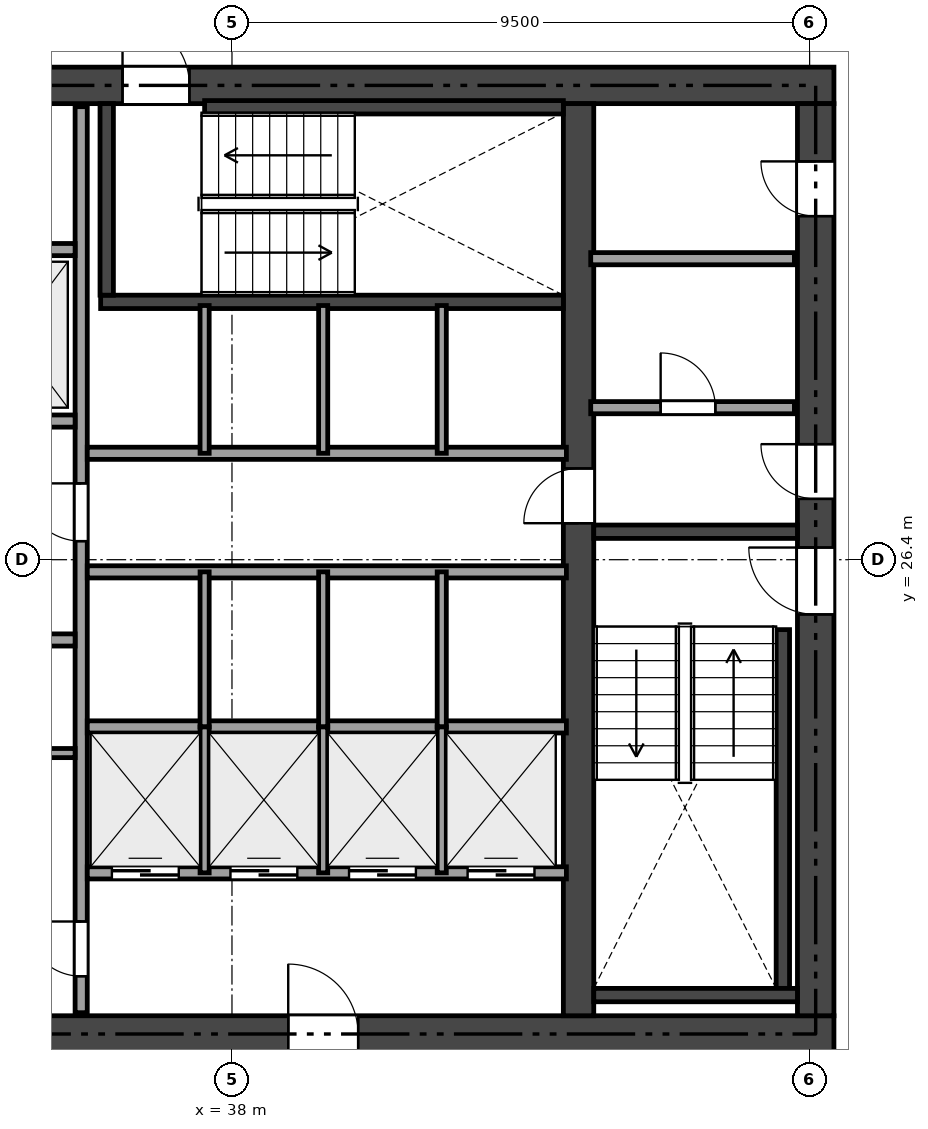
"""IFC4 building model, lengths in metres.
Left out: names, types, materials, properties, quantities, classifications, styles, units other than length and angle.
Written with IfcOpenShell. Run it as: python <this file> out.ifc"""

import sys

from ifc_helpers import new_model, si_unit, direction, frame, frame_2d, origin, place, context, subcontext, project, spatial, rectangle, extrude, element, fill, save


model = new_model("IFC4")
c1 = context("Model", 3, precision=1e-05, world=origin(), true_north=direction((0.0, 1.0)))
c2 = subcontext(c1, "Body", "Model", "MODEL_VIEW")
j1 = project(units=[si_unit("LENGTHUNIT", "METRE"), si_unit("PLANEANGLEUNIT", "RADIAN")], contexts=[c1])
p1 = place(None, origin())
s1 = spatial("IfcSite", under=j1, at=p1, CompositionType="ELEMENT")
p2 = place(p1, origin())
s2 = spatial("IfcBuilding", under=s1, at=p2, CompositionType="ELEMENT")
p3 = place(p2, frame((0.0, 0.0, 76.35)))
s3 = spatial("IfcBuildingStorey", under=s2, at=p3, CompositionType="ELEMENT", Elevation=76.35)
p4 = place(p3, frame((26.5, 18.6, 0.0), z_axis=(0.0, 0.0, 1.0), x_axis=(1.0, 0.0, 0.0)))
e1 = element("IfcWall", 1, at=p4, inside=s3, PredefinedType="SHEAR", context=c2, shape_type="SweptSolid", body=[
    extrude(rectangle(XDim=21.4, YDim=0.6, at=frame_2d((10.7, 0.0))), origin(), (0.0, 0.0, 1.0), 3.17),
])
p5 = place(p4, frame((12.425, 0.0, 0.0)))
e2 = element("IfcOpeningElement", 2, at=p5, cuts=e1, PredefinedType="OPENING", context=c2, shape_type="SweptSolid", body=[
    extrude(rectangle(XDim=1.15, YDim=2.15, at=frame_2d((0.575, 1.075))), frame((0.0, 0.31, 0.0), z_axis=(0.0, -1.0, 0.0), x_axis=(1.0, 0.0, 0.0)), (0.0, 0.0, 1.0), 0.62),
])
p6 = place(p4, frame((5.25, 0.0, 0.0)))
e3 = element("IfcOpeningElement", 3, at=p6, cuts=e1, PredefinedType="OPENING", context=c2, shape_type="SweptSolid", body=[
    extrude(rectangle(XDim=0.9, YDim=2.1, at=frame_2d((0.45, 1.05))), frame((0.0, 0.31, 0.0), z_axis=(0.0, -1.0, 0.0), x_axis=(1.0, 0.0, 0.0)), (0.0, 0.0, 1.0), 0.62),
])
p7 = place(p3, frame((26.5, 34.2, 0.0), z_axis=(0.0, 0.0, 1.0), x_axis=(1.0, 0.0, 0.0)))
e4 = element("IfcWall", 4, at=p7, inside=s3, PredefinedType="SHEAR", context=c2, shape_type="SweptSolid", body=[
    extrude(rectangle(XDim=21.4, YDim=0.6, at=frame_2d((10.7, 0.0))), origin(), (0.0, 0.0, 1.0), 3.17),
])
p8 = place(p7, frame((9.7, 0.0, 0.0)))
e5 = element("IfcOpeningElement", 5, at=p8, cuts=e4, PredefinedType="OPENING", context=c2, shape_type="SweptSolid", body=[
    extrude(rectangle(XDim=1.1, YDim=2.15, at=frame_2d((0.55, 1.075))), frame((0.0, 0.31, 0.0), z_axis=(0.0, -1.0, 0.0), x_axis=(1.0, 0.0, 0.0)), (0.0, 0.0, 1.0), 0.62),
])
p9 = place(p7, frame((1.95, 0.0, 0.0)))
e6 = element("IfcOpeningElement", 6, at=p9, cuts=e4, PredefinedType="OPENING", context=c2, shape_type="SweptSolid", body=[
    extrude(rectangle(XDim=0.9, YDim=2.1, at=frame_2d((0.45, 1.05))), frame((0.0, 0.31, 0.0), z_axis=(0.0, -1.0, 0.0), x_axis=(1.0, 0.0, 0.0)), (0.0, 0.0, 1.0), 0.62),
])
p10 = place(p7, frame((6.25, 0.0, 0.0)))
e7 = element("IfcOpeningElement", 7, at=p10, cuts=e4, PredefinedType="OPENING", context=c2, shape_type="SweptSolid", body=[
    extrude(rectangle(XDim=0.9, YDim=2.1, at=frame_2d((0.45, 1.05))), frame((0.0, 0.31, 0.0), z_axis=(0.0, -1.0, 0.0), x_axis=(1.0, 0.0, 0.0)), (0.0, 0.0, 1.0), 0.62),
])
p11 = place(p3, frame((47.6, 18.9, 0.0), z_axis=(0.0, 0.0, 1.0), x_axis=(0.0, 1.0, 0.0)))
e8 = element("IfcWall", 8, at=p11, inside=s3, PredefinedType="SHEAR", context=c2, shape_type="SweptSolid", body=[
    extrude(rectangle(XDim=15.0, YDim=0.6, at=frame_2d((7.5, 0.0))), origin(), (0.0, 0.0, 1.0), 3.17),
])
p12 = place(p11, frame((6.6, 0.0, 0.0)))
e9 = element("IfcOpeningElement", 9, at=p12, cuts=e8, PredefinedType="OPENING", context=c2, shape_type="SweptSolid", body=[
    extrude(rectangle(XDim=1.1, YDim=2.15, at=frame_2d((0.55, 1.075))), frame((0.0, 0.31, 0.0), z_axis=(0.0, -1.0, 0.0), x_axis=(1.0, 0.0, 0.0)), (0.0, 0.0, 1.0), 0.62),
])
p13 = place(p11, frame((8.5, 0.0, 0.0)))
e10 = element("IfcOpeningElement", 10, at=p13, cuts=e8, PredefinedType="OPENING", context=c2, shape_type="SweptSolid", body=[
    extrude(rectangle(XDim=0.9, YDim=2.1, at=frame_2d((0.45, 1.05))), frame((0.0, 0.31, 0.0), z_axis=(0.0, -1.0, 0.0), x_axis=(1.0, 0.0, 0.0)), (0.0, 0.0, 1.0), 0.62),
])
p14 = place(p11, frame((13.15, 0.0, 0.0)))
e11 = element("IfcOpeningElement", 11, at=p14, cuts=e8, PredefinedType="OPENING", context=c2, shape_type="SweptSolid", body=[
    extrude(rectangle(XDim=0.9, YDim=2.1, at=frame_2d((0.45, 1.05))), frame((0.0, 0.31, 0.0), z_axis=(0.0, -1.0, 0.0), x_axis=(1.0, 0.0, 0.0)), (0.0, 0.0, 1.0), 0.62),
])
p15 = place(p3, frame((43.7, 18.9, 0.0), z_axis=(0.0, 0.0, 1.0), x_axis=(0.0, 1.0, 0.0)))
e12 = element("IfcWall", 12, at=p15, inside=s3, PredefinedType="SHEAR", context=c2, shape_type="SweptSolid", body=[
    extrude(rectangle(XDim=15.0, YDim=0.5, at=frame_2d((7.5, 0.0))), origin(), (0.0, 0.0, 1.0), 3.17),
])
p16 = place(p15, frame((8.1, 0.0, 0.0)))
e13 = element("IfcOpeningElement", 13, at=p16, cuts=e12, PredefinedType="OPENING", context=c2, shape_type="SweptSolid", body=[
    extrude(rectangle(XDim=0.9, YDim=2.1, at=frame_2d((0.45, 1.05))), frame((0.0, 0.26, 0.0), z_axis=(0.0, -1.0, 0.0), x_axis=(1.0, 0.0, 0.0)), (0.0, 0.0, 1.0), 0.52),
])
p17 = place(p3, frame((43.95, 26.86, 0.0), z_axis=(0.0, 0.0, 1.0), x_axis=(1.0, 0.0, 0.0)))
e14 = element("IfcWall", 14, at=p17, inside=s3, PredefinedType="SHEAR", context=c2, shape_type="SweptSolid", body=[
    extrude(rectangle(XDim=3.35, YDim=0.22, at=frame_2d((1.675, 0.0))), origin(), (0.0, 0.0, 1.0), 3.17),
])
p18 = place(p3, frame((47.06, 19.35, 0.0), z_axis=(0.0, 0.0, 1.0), x_axis=(0.0, 1.0, 0.0)))
e15 = element("IfcWall", 15, at=p18, inside=s3, PredefinedType="SHEAR", context=c2, shape_type="SweptSolid", body=[
    extrude(rectangle(XDim=5.9, YDim=0.22, at=frame_2d((2.95, 0.0))), origin(), (0.0, 0.0, 1.0), 3.17),
])
p19 = place(p3, frame((43.95, 19.24, 0.0), z_axis=(0.0, 0.0, 1.0), x_axis=(1.0, 0.0, 0.0)))
e16 = element("IfcWall", 16, at=p19, inside=s3, PredefinedType="SHEAR", context=c2, shape_type="SweptSolid", body=[
    extrude(rectangle(XDim=3.35, YDim=0.22, at=frame_2d((1.675, 0.0))), origin(), (0.0, 0.0, 1.0), 3.17),
])
p20 = place(p3, frame((35.84, 30.64, 0.0), z_axis=(0.0, 0.0, 1.0), x_axis=(1.0, 0.0, 0.0)))
e17 = element("IfcWall", 17, at=p20, inside=s3, PredefinedType="SHEAR", context=c2, shape_type="SweptSolid", body=[
    extrude(rectangle(XDim=7.61, YDim=0.22, at=frame_2d((3.805, 0.0))), origin(), (0.0, 0.0, 1.0), 3.17),
])
p21 = place(p3, frame((35.94, 30.75, 0.0), z_axis=(0.0, 0.0, 1.0), x_axis=(0.0, 1.0, 0.0)))
e18 = element("IfcWall", 18, at=p21, inside=s3, PredefinedType="SHEAR", context=c2, shape_type="SweptSolid", body=[
    extrude(rectangle(XDim=3.15, YDim=0.22, at=frame_2d((1.575, 0.0))), origin(), (0.0, 0.0, 1.0), 3.17),
])
p22 = place(p3, frame((37.55, 33.84, 0.0), z_axis=(0.0, 0.0, 1.0), x_axis=(1.0, 0.0, 0.0)))
e19 = element("IfcWall", 19, at=p22, inside=s3, PredefinedType="SHEAR", context=c2, shape_type="SweptSolid", body=[
    extrude(rectangle(XDim=5.9, YDim=0.22, at=frame_2d((2.95, 0.0))), origin(), (0.0, 0.0, 1.0), 3.17),
])
p23 = place(p3, frame((43.9, 28.9, 0.0), z_axis=(0.0, 0.0, 1.0), x_axis=(1.0, 0.0, 0.0)))
e20 = element("IfcWall", 20, at=p23, inside=s3, PredefinedType="SOLIDWALL", context=c2, shape_type="SweptSolid", body=[
    extrude(rectangle(XDim=3.35, YDim=0.2, at=frame_2d((1.675, 0.0))), origin(), (0.0, 0.0, 1.0), 3.17),
])
p24 = place(p23, frame((1.15, 0.0, 0.0)))
e21 = element("IfcOpeningElement", 21, at=p24, cuts=e20, PredefinedType="OPENING", context=c2, shape_type="SweptSolid", body=[
    extrude(rectangle(XDim=0.9, YDim=2.1, at=frame_2d((0.45, 1.05))), frame((0.0, 0.11, 0.0), z_axis=(0.0, -1.0, 0.0), x_axis=(1.0, 0.0, 0.0)), (0.0, 0.0, 1.0), 0.22),
])
p25 = place(p3, frame((43.9, 31.35, 0.0), z_axis=(0.0, 0.0, 1.0), x_axis=(1.0, 0.0, 0.0)))
e22 = element("IfcWall", 22, at=p25, inside=s3, PredefinedType="SOLIDWALL", context=c2, shape_type="SweptSolid", body=[
    extrude(rectangle(XDim=3.35, YDim=0.2, at=frame_2d((1.675, 0.0))), origin(), (0.0, 0.0, 1.0), 3.17),
])
p26 = place(p3, frame((35.52, 18.95, 0.0), z_axis=(0.0, 0.0, 1.0), x_axis=(0.0, 1.0, 0.0)))
e23 = element("IfcWall", 23, at=p26, inside=s3, PredefinedType="SOLIDWALL", context=c2, shape_type="SweptSolid", body=[
    extrude(rectangle(XDim=14.9, YDim=0.2, at=frame_2d((7.45, 0.0))), origin(), (0.0, 0.0, 1.0), 2.691),
])
p27 = place(p26, frame((7.755, 0.0, 0.0)))
e24 = element("IfcOpeningElement", 24, at=p27, cuts=e23, PredefinedType="OPENING", context=c2, shape_type="SweptSolid", body=[
    extrude(rectangle(XDim=0.95, YDim=2.15, at=frame_2d((0.475, 1.075))), frame((0.0, 0.11, 0.0), z_axis=(0.0, -1.0, 0.0), x_axis=(1.0, 0.0, 0.0)), (0.0, 0.0, 1.0), 0.22),
])
p28 = place(p26, frame((0.6, 0.0, 0.0)))
e25 = element("IfcOpeningElement", 25, at=p28, cuts=e23, PredefinedType="OPENING", context=c2, shape_type="SweptSolid", body=[
    extrude(rectangle(XDim=0.9, YDim=2.1, at=frame_2d((0.45, 1.05))), frame((0.0, 0.11, 0.0), z_axis=(0.0, -1.0, 0.0), x_axis=(1.0, 0.0, 0.0)), (0.0, 0.0, 1.0), 0.22),
])
p29 = place(p3, frame((31.0, 28.68, 0.0), z_axis=(0.0, 0.0, 1.0), x_axis=(1.0, 0.0, 0.0)))
e26 = element("IfcWall", 26, at=p29, inside=s3, PredefinedType="SOLIDWALL", context=c2, shape_type="SweptSolid", body=[
    extrude(rectangle(XDim=4.42, YDim=0.2, at=frame_2d((2.21, 0.0))), origin(), (0.0, 0.0, 1.0), 3.17),
])
p30 = place(p29, frame((0.6, 0.0, 0.0)))
e27 = element("IfcOpeningElement", 27, at=p30, cuts=e26, PredefinedType="OPENING", context=c2, shape_type="SweptSolid", body=[
    extrude(rectangle(XDim=1.1, YDim=2.15, at=frame_2d((0.55, 1.075))), frame((0.0, 0.11, 0.0), z_axis=(0.0, -1.0, 0.0), x_axis=(1.0, 0.0, 0.0)), (0.0, 0.0, 1.0), 0.22),
])
p31 = place(p29, frame((2.85, 0.0, 0.0)))
e28 = element("IfcOpeningElement", 28, at=p31, cuts=e26, PredefinedType="OPENING", context=c2, shape_type="SweptSolid", body=[
    extrude(rectangle(XDim=1.1, YDim=2.15, at=frame_2d((0.55, 1.075))), frame((0.0, 0.11, 0.0), z_axis=(0.0, -1.0, 0.0), x_axis=(1.0, 0.0, 0.0)), (0.0, 0.0, 1.0), 0.22),
])
p32 = place(p3, frame((31.0, 31.5, 0.0), z_axis=(0.0, 0.0, 1.0), x_axis=(1.0, 0.0, 0.0)))
e29 = element("IfcWall", 29, at=p32, inside=s3, PredefinedType="SOLIDWALL", context=c2, shape_type="SweptSolid", body=[
    extrude(rectangle(XDim=4.42, YDim=0.2, at=frame_2d((2.21, 0.0))), origin(), (0.0, 0.0, 1.0), 3.17),
])
p33 = place(p3, frame((31.0, 25.08, 0.0), z_axis=(0.0, 0.0, 1.0), x_axis=(1.0, 0.0, 0.0)))
e30 = element("IfcWall", 30, at=p33, inside=s3, PredefinedType="SOLIDWALL", context=c2, shape_type="SweptSolid", body=[
    extrude(rectangle(XDim=4.42, YDim=0.2, at=frame_2d((2.21, 0.0))), origin(), (0.0, 0.0, 1.0), 3.17),
])
p34 = place(p33, frame((3.0, 0.0, 0.0)))
e31 = element("IfcOpeningElement", 31, at=p34, cuts=e30, PredefinedType="OPENING", context=c2, shape_type="SweptSolid", body=[
    extrude(rectangle(XDim=0.9, YDim=2.1, at=frame_2d((0.45, 1.05))), frame((0.0, 0.11, 0.0), z_axis=(0.0, -1.0, 0.0), x_axis=(1.0, 0.0, 0.0)), (0.0, 0.0, 1.0), 0.22),
])
p35 = place(p33, frame((0.62, 0.0, 0.0)))
e32 = element("IfcOpeningElement", 32, at=p35, cuts=e30, PredefinedType="OPENING", context=c2, shape_type="SweptSolid", body=[
    extrude(rectangle(XDim=1.2, YDim=2.15, at=frame_2d((0.6, 1.075))), frame((0.0, 0.11, 0.0), z_axis=(0.0, -1.0, 0.0), x_axis=(1.0, 0.0, 0.0)), (0.0, 0.0, 1.0), 0.22),
])
p36 = place(p3, frame((33.42, 23.22, 0.0), z_axis=(0.0, 0.0, 1.0), x_axis=(1.0, 0.0, 0.0)))
e33 = element("IfcWall", 33, at=p36, inside=s3, PredefinedType="PARTITIONING", context=c2, shape_type="SweptSolid", body=[
    extrude(rectangle(XDim=2.0, YDim=0.15, at=frame_2d((1.0, 0.0))), origin(), (0.0, 0.0, 1.0), 3.17),
])
for number, where, z_axis, x_axis in (
    (34, (35.62, 28.15, 0.0), (0.0, 0.0, 1.0), (1.0, 0.0, 0.0)),
    (35, (35.62, 26.2, 0.0), (0.0, 0.0, 1.0), (1.0, 0.0, 0.0)),
):
    element("IfcWall", number, at=place(p3, frame(where, z_axis=z_axis, x_axis=x_axis)), inside=s3, PredefinedType="SOLIDWALL", context=c2, shape_type="SweptSolid", body=[
        extrude(rectangle(XDim=7.88, YDim=0.2, at=frame_2d((3.94, 0.0))), origin(), (0.0, 0.0, 1.0), 3.17),
    ])
p37 = place(p3, frame((35.62, 23.65, 0.0), z_axis=(0.0, 0.0, 1.0), x_axis=(1.0, 0.0, 0.0)))
e36 = element("IfcWall", 36, at=p37, inside=s3, PredefinedType="SOLIDWALL", context=c2, shape_type="SweptSolid", body=[
    extrude(rectangle(XDim=7.88, YDim=0.2, at=frame_2d((3.94, 0.0))), origin(), (0.0, 0.0, 1.0), 2.691),
])
p38 = place(p3, frame((35.62, 21.25, 0.0), z_axis=(0.0, 0.0, 1.0), x_axis=(1.0, 0.0, 0.0)))
e37 = element("IfcWall", 37, at=p38, inside=s3, PredefinedType="SOLIDWALL", context=c2, shape_type="SweptSolid", body=[
    extrude(rectangle(XDim=7.88, YDim=0.2, at=frame_2d((3.94, 0.0))), origin(), (0.0, 0.0, 1.0), 3.17),
])
p39 = place(p38, frame((0.405, 0.0, 0.0)))
e38 = element("IfcOpeningElement", 38, at=p39, cuts=e37, PredefinedType="OPENING", context=c2, shape_type="SweptSolid", body=[
    extrude(rectangle(XDim=1.1, YDim=2.15, at=frame_2d((0.55, 1.075))), frame((0.0, 0.11, 0.0), z_axis=(0.0, -1.0, 0.0), x_axis=(1.0, 0.0, 0.0)), (0.0, 0.0, 1.0), 0.22),
])
p40 = place(p38, frame((2.355, 0.0, 0.0)))
e39 = element("IfcOpeningElement", 39, at=p40, cuts=e37, PredefinedType="OPENING", context=c2, shape_type="SweptSolid", body=[
    extrude(rectangle(XDim=1.1, YDim=2.15, at=frame_2d((0.55, 1.075))), frame((0.0, 0.11, 0.0), z_axis=(0.0, -1.0, 0.0), x_axis=(1.0, 0.0, 0.0)), (0.0, 0.0, 1.0), 0.22),
])
p41 = place(p38, frame((4.305, 0.0, 0.0)))
e40 = element("IfcOpeningElement", 40, at=p41, cuts=e37, PredefinedType="OPENING", context=c2, shape_type="SweptSolid", body=[
    extrude(rectangle(XDim=1.1, YDim=2.15, at=frame_2d((0.55, 1.075))), frame((0.0, 0.11, 0.0), z_axis=(0.0, -1.0, 0.0), x_axis=(1.0, 0.0, 0.0)), (0.0, 0.0, 1.0), 0.22),
])
p42 = place(p38, frame((6.255, 0.0, 0.0)))
e41 = element("IfcOpeningElement", 41, at=p42, cuts=e37, PredefinedType="OPENING", context=c2, shape_type="SweptSolid", body=[
    extrude(rectangle(XDim=1.1, YDim=2.15, at=frame_2d((0.55, 1.075))), frame((0.0, 0.11, 0.0), z_axis=(0.0, -1.0, 0.0), x_axis=(1.0, 0.0, 0.0)), (0.0, 0.0, 1.0), 0.22),
])
for number, where, z_axis, x_axis in (
    (42, (37.55, 28.15, 0.0), (0.0, 0.0, 1.0), (0.0, 1.0, 0.0)),
    (43, (39.5, 28.15, 0.0), (0.0, 0.0, 1.0), (0.0, 1.0, 0.0)),
    (44, (41.45, 28.15, 0.0), (0.0, 0.0, 1.0), (0.0, 1.0, 0.0)),
):
    element("IfcWall", number, at=place(p3, frame(where, z_axis=z_axis, x_axis=x_axis)), inside=s3, PredefinedType="PARTITIONING", context=c2, shape_type="SweptSolid", body=[
        extrude(rectangle(XDim=2.43, YDim=0.15, at=frame_2d((1.215, 0.0))), origin(), (0.0, 0.0, 1.0), 3.17),
    ])
for number, where, z_axis, x_axis in (
    (45, (37.55, 23.65, 0.0), (0.0, 0.0, 1.0), (0.0, 1.0, 0.0)),
    (46, (39.5, 23.65, 0.0), (0.0, 0.0, 1.0), (0.0, 1.0, 0.0)),
    (47, (41.45, 23.65, 0.0), (0.0, 0.0, 1.0), (0.0, 1.0, 0.0)),
):
    element("IfcWall", number, at=place(p3, frame(where, z_axis=z_axis, x_axis=x_axis)), inside=s3, PredefinedType="PARTITIONING", context=c2, shape_type="SweptSolid", body=[
        extrude(rectangle(XDim=2.55, YDim=0.15, at=frame_2d((1.275, 0.0))), origin(), (0.0, 0.0, 1.0), 2.691),
    ])
for number, where, z_axis, x_axis in (
    (48, (37.55, 21.25, 0.0), (0.0, 0.0, 1.0), (0.0, 1.0, 0.0)),
    (49, (39.5, 21.25, 0.0), (0.0, 0.0, 1.0), (0.0, 1.0, 0.0)),
    (50, (41.45, 21.25, 0.0), (0.0, 0.0, 1.0), (0.0, 1.0, 0.0)),
):
    element("IfcWall", number, at=place(p3, frame(where, z_axis=z_axis, x_axis=x_axis)), inside=s3, PredefinedType="PARTITIONING", context=c2, shape_type="SweptSolid", body=[
        extrude(rectangle(XDim=2.4, YDim=0.15, at=frame_2d((1.2, 0.0))), origin(), (0.0, 0.0, 1.0), 2.691),
    ])
p43 = place(p12, origin())
e51 = element("IfcDoor", 51, at=p43, inside=s3, OperationType="SINGLE_SWING_RIGHT", PredefinedType="DOOR", context=c2, shape_type="SweptSolid", body=[
    extrude(rectangle(XDim=1.1, YDim=2.15, at=frame_2d((0.55, 1.075))), frame((0.0, 0.025, 0.0), z_axis=(0.0, -1.0, 0.0), x_axis=(1.0, 0.0, 0.0)), (0.0, 0.0, 1.0), 0.05),
])
fill(e9, e51)
p44 = place(p8, origin())
e52 = element("IfcDoor", 52, at=p44, inside=s3, OperationType="SINGLE_SWING_LEFT", PredefinedType="DOOR", context=c2, shape_type="SweptSolid", body=[
    extrude(rectangle(XDim=1.1, YDim=2.15, at=frame_2d((0.55, 1.075))), frame((0.0, 0.025, 0.0), z_axis=(0.0, -1.0, 0.0), x_axis=(1.0, 0.0, 0.0)), (0.0, 0.0, 1.0), 0.05),
])
fill(e5, e52)
p45 = place(p27, origin())
e53 = element("IfcDoor", 53, at=p45, inside=s3, OperationType="SINGLE_SWING_RIGHT", PredefinedType="DOOR", context=c2, shape_type="SweptSolid", body=[
    extrude(rectangle(XDim=0.95, YDim=2.15, at=frame_2d((0.475, 1.075))), frame((0.0, 0.025, 0.0), z_axis=(0.0, -1.0, 0.0), x_axis=(1.0, 0.0, 0.0)), (0.0, 0.0, 1.0), 0.05),
])
fill(e24, e53)
p46 = place(p16, origin())
e54 = element("IfcDoor", 54, at=p46, inside=s3, OperationType="SINGLE_SWING_LEFT", PredefinedType="DOOR", context=c2, shape_type="SweptSolid", body=[
    extrude(rectangle(XDim=0.9, YDim=2.1, at=frame_2d((0.45, 1.05))), frame((0.0, 0.025, 0.0), z_axis=(0.0, -1.0, 0.0), x_axis=(1.0, 0.0, 0.0)), (0.0, 0.0, 1.0), 0.05),
])
fill(e13, e54)
p47 = place(p13, origin())
e55 = element("IfcDoor", 55, at=p47, inside=s3, OperationType="SINGLE_SWING_RIGHT", PredefinedType="DOOR", context=c2, shape_type="SweptSolid", body=[
    extrude(rectangle(XDim=0.9, YDim=2.1, at=frame_2d((0.45, 1.05))), frame((0.0, 0.025, 0.0), z_axis=(0.0, -1.0, 0.0), x_axis=(1.0, 0.0, 0.0)), (0.0, 0.0, 1.0), 0.05),
])
fill(e10, e55)
p48 = place(p5, origin())
e56 = element("IfcDoor", 56, at=p48, inside=s3, OperationType="SINGLE_SWING_LEFT", PredefinedType="DOOR", context=c2, shape_type="SweptSolid", body=[
    extrude(rectangle(XDim=1.15, YDim=2.15, at=frame_2d((0.575, 1.075))), frame((0.0, 0.025, 0.0), z_axis=(0.0, -1.0, 0.0), x_axis=(1.0, 0.0, 0.0)), (0.0, 0.0, 1.0), 0.05),
])
fill(e2, e56)
p49 = place(p24, origin())
e57 = element("IfcDoor", 57, at=p49, inside=s3, OperationType="SINGLE_SWING_LEFT", PredefinedType="DOOR", context=c2, shape_type="SweptSolid", body=[
    extrude(rectangle(XDim=0.9, YDim=2.1, at=frame_2d((0.45, 1.05))), frame((0.0, 0.025, 0.0), z_axis=(0.0, -1.0, 0.0), x_axis=(1.0, 0.0, 0.0)), (0.0, 0.0, 1.0), 0.05),
])
fill(e21, e57)
p50 = place(p14, origin())
e58 = element("IfcDoor", 58, at=p50, inside=s3, OperationType="SINGLE_SWING_RIGHT", PredefinedType="DOOR", context=c2, shape_type="SweptSolid", body=[
    extrude(rectangle(XDim=0.9, YDim=2.1, at=frame_2d((0.45, 1.05))), frame((0.0, 0.025, 0.0), z_axis=(0.0, -1.0, 0.0), x_axis=(1.0, 0.0, 0.0)), (0.0, 0.0, 1.0), 0.05),
])
fill(e11, e58)
p51 = place(p28, origin())
e59 = element("IfcDoor", 59, at=p51, inside=s3, OperationType="SINGLE_SWING_RIGHT", PredefinedType="DOOR", context=c2, shape_type="SweptSolid", body=[
    extrude(rectangle(XDim=0.9, YDim=2.1, at=frame_2d((0.45, 1.05))), frame((0.0, 0.025, 0.0), z_axis=(0.0, -1.0, 0.0), x_axis=(1.0, 0.0, 0.0)), (0.0, 0.0, 1.0), 0.05),
])
fill(e25, e59)
p52 = place(p39, origin())
e60 = element("IfcDoor", 60, at=p52, inside=s3, OperationType="SLIDING_TO_LEFT", PredefinedType="DOOR", context=c2, shape_type="SweptSolid", body=[
    extrude(rectangle(XDim=1.1, YDim=2.15, at=frame_2d((0.55, 1.075))), frame((0.0, 0.025, 0.0), z_axis=(0.0, -1.0, 0.0), x_axis=(1.0, 0.0, 0.0)), (0.0, 0.0, 1.0), 0.05),
])
fill(e38, e60)
p53 = place(p40, origin())
e61 = element("IfcDoor", 61, at=p53, inside=s3, OperationType="SLIDING_TO_LEFT", PredefinedType="DOOR", context=c2, shape_type="SweptSolid", body=[
    extrude(rectangle(XDim=1.1, YDim=2.15, at=frame_2d((0.55, 1.075))), frame((0.0, 0.025, 0.0), z_axis=(0.0, -1.0, 0.0), x_axis=(1.0, 0.0, 0.0)), (0.0, 0.0, 1.0), 0.05),
])
fill(e39, e61)
p54 = place(p41, origin())
e62 = element("IfcDoor", 62, at=p54, inside=s3, OperationType="SLIDING_TO_LEFT", PredefinedType="DOOR", context=c2, shape_type="SweptSolid", body=[
    extrude(rectangle(XDim=1.1, YDim=2.15, at=frame_2d((0.55, 1.075))), frame((0.0, 0.025, 0.0), z_axis=(0.0, -1.0, 0.0), x_axis=(1.0, 0.0, 0.0)), (0.0, 0.0, 1.0), 0.05),
])
fill(e40, e62)
p55 = place(p42, origin())
e63 = element("IfcDoor", 63, at=p55, inside=s3, OperationType="SLIDING_TO_LEFT", PredefinedType="DOOR", context=c2, shape_type="SweptSolid", body=[
    extrude(rectangle(XDim=1.1, YDim=2.15, at=frame_2d((0.55, 1.075))), frame((0.0, 0.025, 0.0), z_axis=(0.0, -1.0, 0.0), x_axis=(1.0, 0.0, 0.0)), (0.0, 0.0, 1.0), 0.05),
])
fill(e41, e63)
save(model, sys.argv[1])
